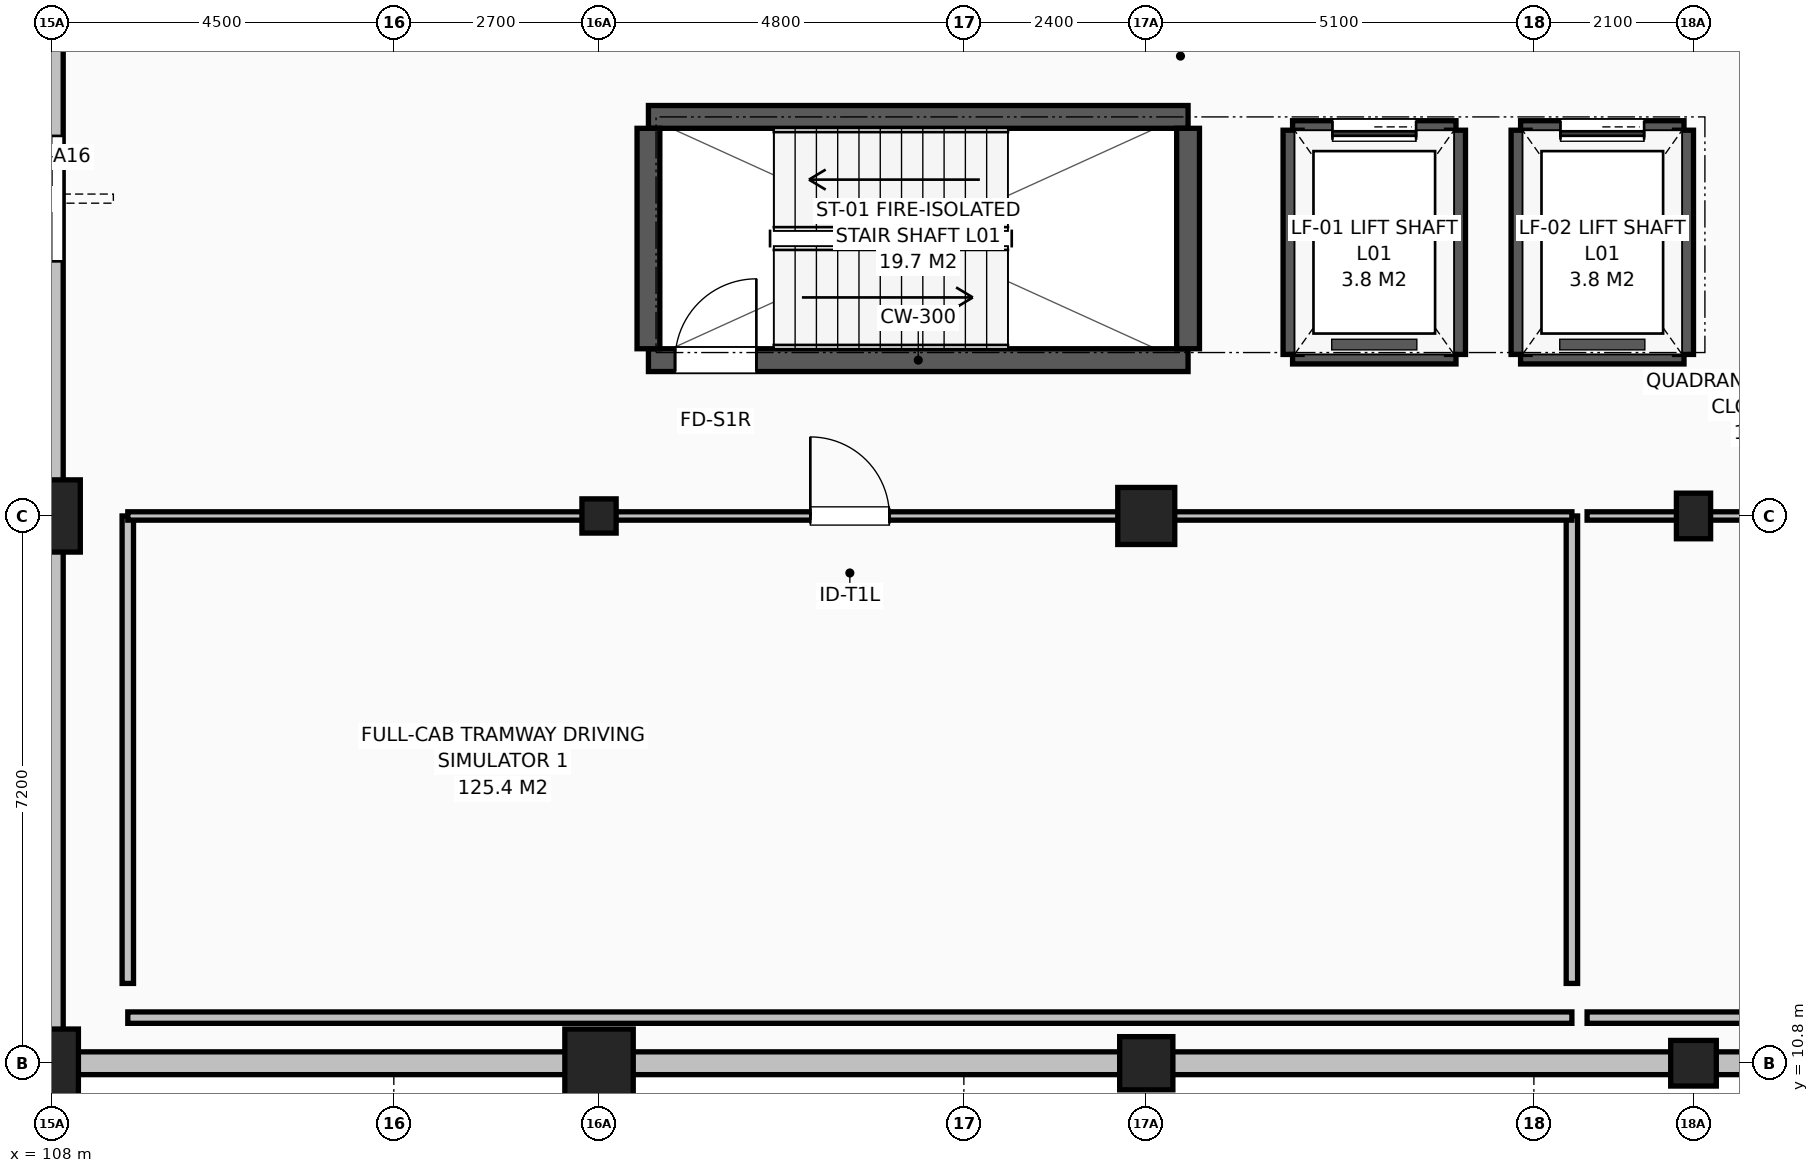
"""IFC4 building model, lengths in metres.
Left out: names, types, materials, properties, quantities, classifications, styles, units other than length and angle.
Written with IfcOpenShell. Run it as: python <this file> out.ifc"""

import sys

from ifc_helpers import new_model, si_unit, direction, frame, frame_2d, origin, origin_2d, place, context, subcontext, project, spatial, rectangle, circle, extrude, element, fill, save


model = new_model("IFC4")
c1 = context("Model", 3, precision=1e-05, world=origin(), true_north=direction((0.0, 1.0)))
c2 = subcontext(c1, "Body", "Model", "MODEL_VIEW")
j1 = project(units=[si_unit("LENGTHUNIT", "METRE"), si_unit("PLANEANGLEUNIT", "RADIAN")], contexts=[c1])
p1 = place(None, origin())
s1 = spatial("IfcSite", under=j1, at=p1, CompositionType="ELEMENT")
p2 = place(p1, origin())
s2 = spatial("IfcBuilding", under=s1, at=p2, CompositionType="ELEMENT")
p3 = place(p2, frame((0.0, 0.0, 4.8)))
s3 = spatial("IfcBuildingStorey", under=s2, at=p3, CompositionType="ELEMENT", Elevation=4.8)
p4 = place(p3, frame((108.0, 10.8, 0.0), z_axis=(0.0, 0.0, 1.0), x_axis=(1.0, 0.0, 0.0)))
e1 = element("IfcColumn", 1, at=p4, inside=s3, PredefinedType="COLUMN", context=c2, shape_type="SweptSolid", body=[
    extrude(rectangle(XDim=0.7, YDim=0.9, at=origin_2d()), origin(), (0.0, 0.0, 1.0), 4.2),
])
p5 = place(p3, frame((108.0, 18.0, 0.0), z_axis=(0.0, 0.0, 1.0), x_axis=(1.0, 0.0, 0.0)))
e2 = element("IfcColumn", 2, at=p5, inside=s3, PredefinedType="COLUMN", context=c2, shape_type="SweptSolid", body=[
    extrude(rectangle(XDim=0.75, YDim=0.95, at=origin_2d()), origin(), (0.0, 0.0, 1.0), 4.2),
])
p6 = place(p3, frame((115.2, 10.8, 0.0), z_axis=(0.0, 0.0, 1.0), x_axis=(1.0, 0.0, 0.0)))
e3 = element("IfcColumn", 3, at=p6, inside=s3, PredefinedType="COLUMN", context=c2, shape_type="SweptSolid", body=[
    extrude(circle(Radius=0.45, at=origin_2d()), origin(), (0.0, 0.0, 1.0), 4.2),
])
p7 = place(p3, frame((115.2, 18.0, 0.0), z_axis=(0.0, 0.0, 1.0), x_axis=(1.0, 0.0, 0.0)))
e4 = element("IfcColumn", 4, at=p7, inside=s3, PredefinedType="COLUMN", context=c2, shape_type="SweptSolid", body=[
    extrude(rectangle(XDim=0.45, YDim=0.45, at=origin_2d()), origin(), (0.0, 0.0, 1.0), 4.2),
])
p8 = place(p3, frame((122.4, 10.8, 0.0), z_axis=(0.0, 0.0, 1.0), x_axis=(1.0, 0.0, 0.0)))
e5 = element("IfcColumn", 5, at=p8, inside=s3, PredefinedType="COLUMN", context=c2, shape_type="SweptSolid", body=[
    extrude(rectangle(XDim=0.7, YDim=0.7, at=origin_2d()), origin(), (0.0, 0.0, 1.0), 4.2),
])
p9 = place(p3, frame((122.4, 18.0, 0.0), z_axis=(0.0, 0.0, 1.0), x_axis=(1.0, 0.0, 0.0)))
e6 = element("IfcColumn", 6, at=p9, inside=s3, PredefinedType="COLUMN", context=c2, shape_type="SweptSolid", body=[
    extrude(rectangle(XDim=0.75, YDim=0.75, at=origin_2d()), origin(), (0.0, 0.0, 1.0), 4.2),
])
p10 = place(p3, frame((129.6, 10.8, 0.0), z_axis=(0.0, 0.0, 1.0), x_axis=(1.0, 0.0, 0.0)))
e7 = element("IfcColumn", 7, at=p10, inside=s3, PredefinedType="COLUMN", context=c2, shape_type="SweptSolid", body=[
    extrude(circle(Radius=0.3, at=origin_2d()), origin(), (0.0, 0.0, 1.0), 4.2),
])
p11 = place(p3, frame((129.6, 18.0, 0.0), z_axis=(0.0, 0.0, 1.0), x_axis=(1.0, 0.0, 0.0)))
e8 = element("IfcColumn", 8, at=p11, inside=s3, PredefinedType="COLUMN", context=c2, shape_type="SweptSolid", body=[
    extrude(rectangle(XDim=0.45, YDim=0.6, at=origin_2d()), origin(), (0.0, 0.0, 1.0), 4.2),
])
p12 = place(p3, frame((108.0, 10.8, 0.0), z_axis=(0.0, 0.0, 1.0), x_axis=(1.0, 0.0, 0.0)))
e9 = element("IfcWall", 9, at=p12, inside=s3, PredefinedType="SOLIDWALL", context=c2, shape_type="SweptSolid", body=[
    extrude(rectangle(XDim=79.2, YDim=0.3, at=frame_2d((39.6, 0.0))), origin(), (0.0, 0.0, 1.0), 2.872),
])
p13 = place(p3, frame((108.0, 54.0, 0.0), z_axis=(0.0, 0.0, 1.0), x_axis=(0.0, -1.0, 0.0)))
e10 = element("IfcWall", 10, at=p13, inside=s3, PredefinedType="SOLIDWALL", context=c2, shape_type="SweptSolid", body=[
    extrude(rectangle(XDim=43.2, YDim=0.3, at=frame_2d((21.6, 0.0))), origin(), (0.0, 0.0, 1.0), 3.5),
])
p14 = place(p13, frame((2.2, 0.0, 0.72)))
e11 = element("IfcOpeningElement", 11, at=p14, cuts=e10, PredefinedType="OPENING", context=c2, shape_type="SweptSolid", body=[
    extrude(rectangle(XDim=1.8, YDim=2.15, at=frame_2d((0.9, 1.075))), frame((0.0, 0.16, 0.0), z_axis=(0.0, -1.0, 0.0), x_axis=(1.0, 0.0, 0.0)), (0.0, 0.0, 1.0), 0.32),
])
p15 = place(p13, frame((16.6, 0.0, 0.72)))
e12 = element("IfcOpeningElement", 12, at=p15, cuts=e10, PredefinedType="OPENING", context=c2, shape_type="SweptSolid", body=[
    extrude(rectangle(XDim=1.35, YDim=2.05, at=frame_2d((0.675, 1.025))), frame((0.0, 0.16, 0.0), z_axis=(0.0, -1.0, 0.0), x_axis=(1.0, 0.0, 0.0)), (0.0, 0.0, 1.0), 0.32),
])
p16 = place(p13, frame((23.8, 0.0, 0.72)))
e13 = element("IfcOpeningElement", 13, at=p16, cuts=e10, PredefinedType="OPENING", context=c2, shape_type="SweptSolid", body=[
    extrude(rectangle(XDim=1.5, YDim=2.1, at=frame_2d((0.75, 1.05))), frame((0.0, 0.16, 0.0), z_axis=(0.0, -1.0, 0.0), x_axis=(1.0, 0.0, 0.0)), (0.0, 0.0, 1.0), 0.32),
])
p17 = place(p13, frame((31.0, 0.0, 0.72)))
e14 = element("IfcOpeningElement", 14, at=p17, cuts=e10, PredefinedType="OPENING", context=c2, shape_type="SweptSolid", body=[
    extrude(rectangle(XDim=1.65, YDim=2.1, at=frame_2d((0.825, 1.05))), frame((0.0, 0.16, 0.0), z_axis=(0.0, -1.0, 0.0), x_axis=(1.0, 0.0, 0.0)), (0.0, 0.0, 1.0), 0.32),
])
p18 = place(p3, frame((115.85, 20.05, 0.0), z_axis=(0.0, 0.0, 1.0), x_axis=(1.0, 0.0, 0.0)))
e15 = element("IfcWall", 15, at=p18, inside=s3, PredefinedType="SHEAR", context=c2, shape_type="SweptSolid", body=[
    extrude(rectangle(XDim=7.1, YDim=0.3, at=frame_2d((3.55, 0.0))), origin(), (0.0, 0.0, 1.0), 3.84),
])
p19 = place(p18, frame((0.35, 0.0, 0.0)))
e16 = element("IfcOpeningElement", 16, at=p19, cuts=e15, PredefinedType="OPENING", context=c2, shape_type="SweptSolid", body=[
    extrude(rectangle(XDim=1.07, YDim=2.15, at=frame_2d((0.535, 1.075))), frame((0.0, 0.16, 0.0), z_axis=(0.0, -1.0, 0.0), x_axis=(1.0, 0.0, 0.0)), (0.0, 0.0, 1.0), 0.32),
])
p20 = place(p3, frame((122.95, 23.25, 0.0), z_axis=(0.0, 0.0, 1.0), x_axis=(-1.0, 0.0, 0.0)))
e17 = element("IfcWall", 17, at=p20, inside=s3, PredefinedType="SHEAR", context=c2, shape_type="SweptSolid", body=[
    extrude(rectangle(XDim=7.1, YDim=0.3, at=frame_2d((3.55, 0.0))), origin(), (0.0, 0.0, 1.0), 3.84),
])
for number, where, z_axis, x_axis in (
    (18, (122.95, 20.2, 0.0), (0.0, 0.0, 1.0), (0.0, 1.0, 0.0)),
    (19, (115.85, 23.1, 0.0), (0.0, 0.0, 1.0), (0.0, -1.0, 0.0)),
):
    element("IfcWall", number, at=place(p3, frame(where, z_axis=z_axis, x_axis=x_axis)), inside=s3, PredefinedType="SHEAR", context=c2, shape_type="SweptSolid", body=[
        extrude(rectangle(XDim=2.9, YDim=0.3, at=frame_2d((1.45, 0.0))), origin(), (0.0, 0.0, 1.0), 3.84),
    ])
p21 = place(p3, frame((124.325, 20.125, 0.0), z_axis=(0.0, 0.0, 1.0), x_axis=(1.0, 0.0, 0.0)))
e20 = element("IfcWall", 20, at=p21, inside=s3, PredefinedType="SHEAR", context=c2, shape_type="SweptSolid", body=[
    extrude(rectangle(XDim=2.15, YDim=0.25, at=frame_2d((1.075, 0.0))), origin(), (0.0, 0.0, 1.0), 3.9),
])
p22 = place(p3, frame((126.475, 23.075, 0.0), z_axis=(0.0, 0.0, 1.0), x_axis=(-1.0, 0.0, 0.0)))
e21 = element("IfcWall", 21, at=p22, inside=s3, PredefinedType="SHEAR", context=c2, shape_type="SweptSolid", body=[
    extrude(rectangle(XDim=2.15, YDim=0.25, at=frame_2d((1.075, 0.0))), origin(), (0.0, 0.0, 1.0), 3.9),
])
p23 = place(p22, frame((0.525, 0.0, 0.0)))
e22 = element("IfcOpeningElement", 22, at=p23, cuts=e21, PredefinedType="OPENING", context=c2, shape_type="SweptSolid", body=[
    extrude(rectangle(XDim=1.1, YDim=2.15, at=frame_2d((0.55, 1.075))), frame((0.0, 0.135, 0.0), z_axis=(0.0, -1.0, 0.0), x_axis=(1.0, 0.0, 0.0)), (0.0, 0.0, 1.0), 0.27),
])
for number, where, z_axis, x_axis in (
    (23, (124.325, 23.075, 0.0), (0.0, 0.0, 1.0), (0.0, -1.0, 0.0)),
    (24, (126.475, 20.125, 0.0), (0.0, 0.0, 1.0), (0.0, 1.0, 0.0)),
):
    element("IfcWall", number, at=place(p3, frame(where, z_axis=z_axis, x_axis=x_axis)), inside=s3, PredefinedType="SHEAR", context=c2, shape_type="SweptSolid", body=[
        extrude(rectangle(XDim=2.95, YDim=0.25, at=frame_2d((1.475, 0.0))), origin(), (0.0, 0.0, 1.0), 3.9),
    ])
p24 = place(p3, frame((127.325, 20.125, 0.0), z_axis=(0.0, 0.0, 1.0), x_axis=(1.0, 0.0, 0.0)))
e25 = element("IfcWall", 25, at=p24, inside=s3, PredefinedType="SHEAR", context=c2, shape_type="SweptSolid", body=[
    extrude(rectangle(XDim=2.15, YDim=0.25, at=frame_2d((1.075, 0.0))), origin(), (0.0, 0.0, 1.0), 3.9),
])
p25 = place(p3, frame((129.475, 23.075, 0.0), z_axis=(0.0, 0.0, 1.0), x_axis=(-1.0, 0.0, 0.0)))
e26 = element("IfcWall", 26, at=p25, inside=s3, PredefinedType="SHEAR", context=c2, shape_type="SweptSolid", body=[
    extrude(rectangle(XDim=2.15, YDim=0.25, at=frame_2d((1.075, 0.0))), origin(), (0.0, 0.0, 1.0), 3.9),
])
p26 = place(p25, frame((0.525, 0.0, 0.0)))
e27 = element("IfcOpeningElement", 27, at=p26, cuts=e26, PredefinedType="OPENING", context=c2, shape_type="SweptSolid", body=[
    extrude(rectangle(XDim=1.1, YDim=2.15, at=frame_2d((0.55, 1.075))), frame((0.0, 0.135, 0.0), z_axis=(0.0, -1.0, 0.0), x_axis=(1.0, 0.0, 0.0)), (0.0, 0.0, 1.0), 0.27),
])
for number, where, z_axis, x_axis in (
    (28, (127.325, 23.075, 0.0), (0.0, 0.0, 1.0), (0.0, -1.0, 0.0)),
    (29, (129.475, 20.125, 0.0), (0.0, 0.0, 1.0), (0.0, 1.0, 0.0)),
):
    element("IfcWall", number, at=place(p3, frame(where, z_axis=z_axis, x_axis=x_axis)), inside=s3, PredefinedType="SHEAR", context=c2, shape_type="SweptSolid", body=[
        extrude(rectangle(XDim=2.95, YDim=0.25, at=frame_2d((1.475, 0.0))), origin(), (0.0, 0.0, 1.0), 3.9),
    ])
p27 = place(p3, frame((128.0, 11.4, 0.0), z_axis=(0.0, 0.0, 1.0), x_axis=(-1.0, 0.0, 0.0)))
e30 = element("IfcWall", 30, at=p27, inside=s3, PredefinedType="PARTITIONING", context=c2, shape_type="SweptSolid", body=[
    extrude(rectangle(XDim=19.0, YDim=0.15, at=frame_2d((9.5, 0.0))), origin(), (0.0, 0.0, 1.0), 3.172),
])
p28 = place(p3, frame((128.0, 11.85, 0.0), z_axis=(0.0, 0.0, 1.0), x_axis=(0.0, 1.0, 0.0)))
e31 = element("IfcWall", 31, at=p28, inside=s3, PredefinedType="PARTITIONING", context=c2, shape_type="SweptSolid", body=[
    extrude(rectangle(XDim=6.15, YDim=0.15, at=frame_2d((3.075, 0.0))), origin(), (0.0, 0.0, 1.0), 2.922),
])
p29 = place(p3, frame((109.0, 18.0, 0.0), z_axis=(0.0, 0.0, 1.0), x_axis=(0.0, -1.0, 0.0)))
e32 = element("IfcWall", 32, at=p29, inside=s3, PredefinedType="PARTITIONING", context=c2, shape_type="SweptSolid", body=[
    extrude(rectangle(XDim=6.15, YDim=0.15, at=frame_2d((3.075, 0.0))), origin(), (0.0, 0.0, 1.0), 3.022),
])
p30 = place(p3, frame((109.0, 18.0, 0.0), z_axis=(0.0, 0.0, 1.0), x_axis=(1.0, 0.0, 0.0)))
e33 = element("IfcWall", 33, at=p30, inside=s3, PredefinedType="PARTITIONING", context=c2, shape_type="SweptSolid", body=[
    extrude(rectangle(XDim=19.0, YDim=0.11, at=frame_2d((9.5, 0.0))), origin(), (0.0, 0.0, 1.0), 2.922),
])
p31 = place(p30, frame((8.98, 0.0, 0.0)))
e34 = element("IfcOpeningElement", 34, at=p31, cuts=e33, PredefinedType="OPENING", context=c2, shape_type="SweptSolid", body=[
    extrude(rectangle(XDim=1.04, YDim=2.15, at=frame_2d((0.52, 1.075))), frame((0.0, 0.065, 0.0), z_axis=(0.0, -1.0, 0.0), x_axis=(1.0, 0.0, 0.0)), (0.0, 0.0, 1.0), 0.13),
])
p32 = place(p3, frame((147.0, 11.4, 0.0), z_axis=(0.0, 0.0, 1.0), x_axis=(-1.0, 0.0, 0.0)))
e35 = element("IfcWall", 35, at=p32, inside=s3, PredefinedType="PARTITIONING", context=c2, shape_type="SweptSolid", body=[
    extrude(rectangle(XDim=18.8, YDim=0.15, at=frame_2d((9.4, 0.0))), origin(), (0.0, 0.0, 1.0), 3.122),
])
p33 = place(p3, frame((128.2, 18.0, 0.0), z_axis=(0.0, 0.0, 1.0), x_axis=(1.0, 0.0, 0.0)))
e36 = element("IfcWall", 36, at=p33, inside=s3, PredefinedType="PARTITIONING", context=c2, shape_type="SweptSolid", body=[
    extrude(rectangle(XDim=18.8, YDim=0.11, at=frame_2d((9.4, 0.0))), origin(), (0.0, 0.0, 1.0), 2.822),
])
p34 = place(p33, frame((5.322, 0.0, 0.0)))
e37 = element("IfcOpeningElement", 37, at=p34, cuts=e36, PredefinedType="OPENING", context=c2, shape_type="SweptSolid", body=[
    extrude(rectangle(XDim=1.06, YDim=2.15, at=frame_2d((0.53, 1.075))), frame((0.0, 0.065, 0.0), z_axis=(0.0, -1.0, 0.0), x_axis=(1.0, 0.0, 0.0)), (0.0, 0.0, 1.0), 0.13),
])
p35 = place(p17, origin())
e38 = element("IfcWindow", 38, at=p35, inside=s3, PartitioningType="SINGLE_PANEL", PredefinedType="WINDOW", context=c2, shape_type="SweptSolid", body=[
    extrude(rectangle(XDim=1.65, YDim=2.1, at=frame_2d((0.825, 1.05))), frame((0.0, 0.03, 0.0), z_axis=(0.0, -1.0, 0.0), x_axis=(1.0, 0.0, 0.0)), (0.0, 0.0, 1.0), 0.06),
])
fill(e14, e38)
p36 = place(p19, origin())
e39 = element("IfcDoor", 39, at=p36, inside=s3, OperationType="SINGLE_SWING_RIGHT", PredefinedType="DOOR", context=c2, shape_type="SweptSolid", body=[
    extrude(rectangle(XDim=1.07, YDim=2.15, at=frame_2d((0.535, 1.075))), frame((0.0, 0.025, 0.0), z_axis=(0.0, -1.0, 0.0), x_axis=(1.0, 0.0, 0.0)), (0.0, 0.0, 1.0), 0.05),
])
fill(e16, e39)
p37 = place(p23, origin())
e40 = element("IfcDoor", 40, at=p37, inside=s3, OperationType="SLIDING_TO_LEFT", PredefinedType="DOOR", context=c2, shape_type="SweptSolid", body=[
    extrude(rectangle(XDim=1.1, YDim=2.15, at=frame_2d((0.55, 1.075))), frame((0.0, 0.025, 0.0), z_axis=(0.0, -1.0, 0.0), x_axis=(1.0, 0.0, 0.0)), (0.0, 0.0, 1.0), 0.05),
])
fill(e22, e40)
p38 = place(p26, origin())
e41 = element("IfcDoor", 41, at=p38, inside=s3, OperationType="SLIDING_TO_LEFT", PredefinedType="DOOR", context=c2, shape_type="SweptSolid", body=[
    extrude(rectangle(XDim=1.1, YDim=2.15, at=frame_2d((0.55, 1.075))), frame((0.0, 0.025, 0.0), z_axis=(0.0, -1.0, 0.0), x_axis=(1.0, 0.0, 0.0)), (0.0, 0.0, 1.0), 0.05),
])
fill(e27, e41)
p39 = place(p31, origin())
e42 = element("IfcDoor", 42, at=p39, inside=s3, OperationType="SINGLE_SWING_LEFT", PredefinedType="DOOR", context=c2, shape_type="SweptSolid", body=[
    extrude(rectangle(XDim=1.04, YDim=2.15, at=frame_2d((0.52, 1.075))), frame((0.0, 0.025, 0.0), z_axis=(0.0, -1.0, 0.0), x_axis=(1.0, 0.0, 0.0)), (0.0, 0.0, 1.0), 0.05),
])
fill(e34, e42)
save(model, sys.argv[1])
